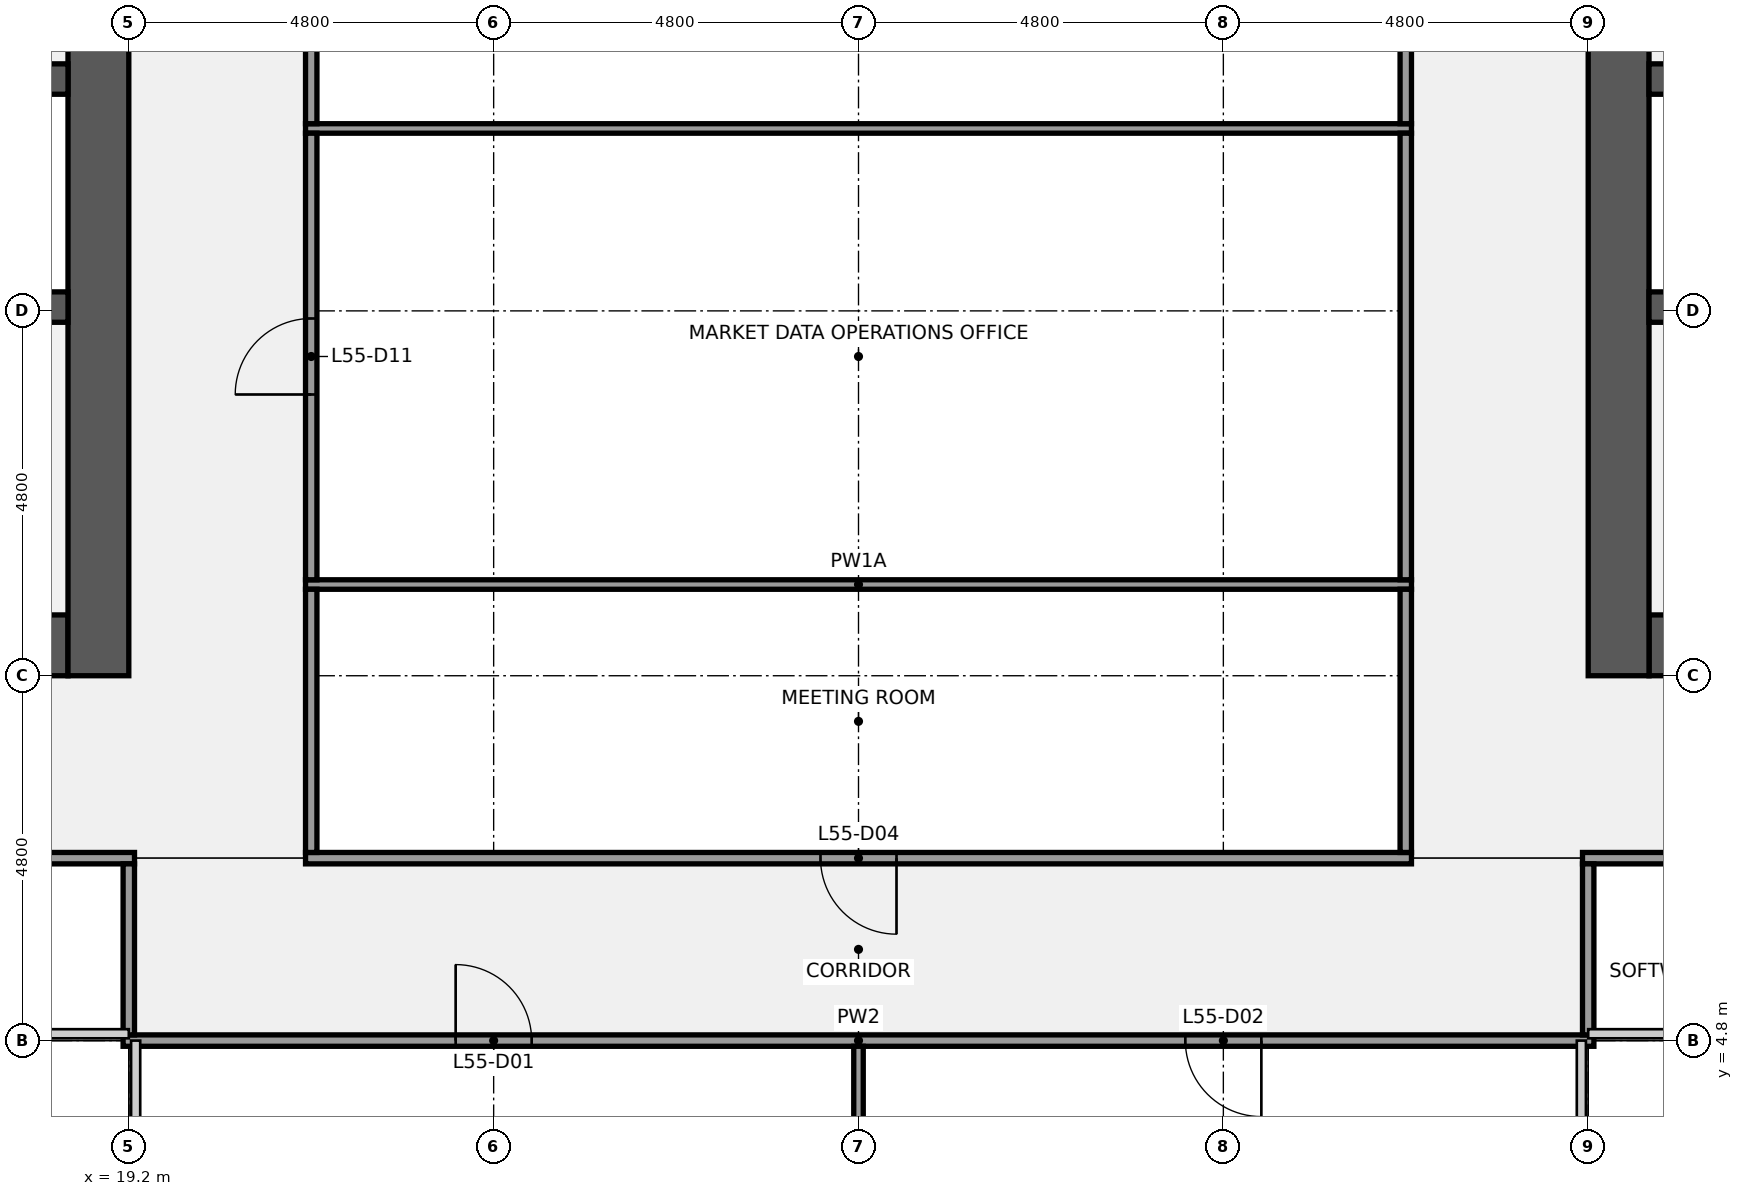
"""IFC4 building model, lengths in metres.
Left out: names, types, materials, properties, quantities, classifications, styles, units other than length and angle.
Written with IfcOpenShell. Run it as: python <this file> out.ifc"""

import sys

from ifc_helpers import new_model, si_unit, direction, frame, frame_2d, origin, place, context, subcontext, project, spatial, rectangle, extrude, element, fill, save


model = new_model("IFC4")
c1 = context("Model", 3, precision=1e-05, world=origin(), true_north=direction((0.0, 1.0)))
c2 = subcontext(c1, "Body", "Model", "MODEL_VIEW")
j1 = project(units=[si_unit("LENGTHUNIT", "METRE"), si_unit("PLANEANGLEUNIT", "RADIAN")], contexts=[c1])
p1 = place(None, origin())
s1 = spatial("IfcSite", under=j1, at=p1, CompositionType="ELEMENT")
p2 = place(p1, origin())
s2 = spatial("IfcBuilding", under=s1, at=p2, CompositionType="ELEMENT")
p3 = place(p2, frame((0.0, 0.0, 249.2)))
s3 = spatial("IfcBuildingStorey", under=s2, at=p3, CompositionType="ELEMENT", Elevation=249.2)
p4 = place(p3, frame((18.4, 10.0, 0.0), z_axis=(0.0, 0.0, 1.0), x_axis=(-1.0, 0.0, 0.0)))
e1 = element("IfcWall", 1, at=p4, inside=s3, PredefinedType="SHEAR", context=c2, shape_type="SweptSolid", body=[
    extrude(rectangle(XDim=4.0, YDim=0.8, at=frame_2d((2.0, 0.0))), origin(), (0.0, 0.0, 1.0), 3.84),
])
p5 = place(p4, frame((1.05, 0.0, 0.0)))
e2 = element("IfcOpeningElement", 2, at=p5, cuts=e1, PredefinedType="OPENING", context=c2, shape_type="SweptSolid", body=[
    extrude(rectangle(XDim=1.1, YDim=2.1, at=frame_2d((0.55, 1.05))), frame((0.0, 0.41, 0.0), z_axis=(0.0, -1.0, 0.0), x_axis=(1.0, 0.0, 0.0)), (0.0, 0.0, 1.0), 0.82),
])
p6 = place(p3, frame((18.8, 38.4, 0.0), z_axis=(0.0, 0.0, 1.0), x_axis=(0.0, -1.0, 0.0)))
e3 = element("IfcWall", 3, at=p6, inside=s3, PredefinedType="SHEAR", context=c2, shape_type="SweptSolid", body=[
    extrude(rectangle(XDim=28.8, YDim=0.8, at=frame_2d((14.4, 0.0))), origin(), (0.0, 0.0, 1.0), 3.84),
])
p7 = place(p6, frame((18.3, 0.0, 0.0)))
e4 = element("IfcOpeningElement", 4, at=p7, cuts=e3, PredefinedType="OPENING", context=c2, shape_type="SweptSolid", body=[
    extrude(rectangle(XDim=1.8, YDim=2.1, at=frame_2d((0.9, 1.05))), frame((0.0, 0.41, 0.0), z_axis=(0.0, -1.0, 0.0), x_axis=(1.0, 0.0, 0.0)), (0.0, 0.0, 1.0), 0.82),
])
p8 = place(p6, frame((8.7, 0.0, 0.0)))
e5 = element("IfcOpeningElement", 5, at=p8, cuts=e3, PredefinedType="OPENING", context=c2, shape_type="SweptSolid", body=[
    extrude(rectangle(XDim=1.8, YDim=2.1, at=frame_2d((0.9, 1.05))), frame((0.0, 0.41, 0.0), z_axis=(0.0, -1.0, 0.0), x_axis=(1.0, 0.0, 0.0)), (0.0, 0.0, 1.0), 0.82),
])
p9 = place(p3, frame((0.8, 14.45, 0.0), z_axis=(0.0, 0.0, 1.0), x_axis=(1.0, 0.0, 0.0)))
e6 = element("IfcWall", 6, at=p9, inside=s3, PredefinedType="SHEAR", context=c2, shape_type="SweptSolid", body=[
    extrude(rectangle(XDim=17.6, YDim=0.4, at=frame_2d((8.8, 0.0))), origin(), (0.0, 0.0, 1.0), 3.84),
])
p10 = place(p3, frame((0.8, 17.45, 0.0), z_axis=(0.0, 0.0, 1.0), x_axis=(1.0, 0.0, 0.0)))
e7 = element("IfcWall", 7, at=p10, inside=s3, PredefinedType="SHEAR", context=c2, shape_type="SweptSolid", body=[
    extrude(rectangle(XDim=17.6, YDim=0.4, at=frame_2d((8.8, 0.0))), origin(), (0.0, 0.0, 1.0), 3.84),
])
p11 = place(p10, frame((0.863, 0.0, 0.0)))
e8 = element("IfcOpeningElement", 8, at=p11, cuts=e7, PredefinedType="OPENING", context=c2, shape_type="SweptSolid", body=[
    extrude(rectangle(XDim=1.0, YDim=2.1, at=frame_2d((0.5, 1.05))), frame((0.0, 0.21, 0.0), z_axis=(0.0, -1.0, 0.0), x_axis=(1.0, 0.0, 0.0)), (0.0, 0.0, 1.0), 0.42),
])
p12 = place(p10, frame((3.8, 0.0, 0.0)))
e9 = element("IfcOpeningElement", 9, at=p12, cuts=e7, PredefinedType="OPENING", context=c2, shape_type="SweptSolid", body=[
    extrude(rectangle(XDim=1.0, YDim=2.1, at=frame_2d((0.5, 1.05))), frame((0.0, 0.21, 0.0), z_axis=(0.0, -1.0, 0.0), x_axis=(1.0, 0.0, 0.0)), (0.0, 0.0, 1.0), 0.42),
])
p13 = place(p10, frame((6.8, 0.0, 0.0)))
e10 = element("IfcOpeningElement", 10, at=p13, cuts=e7, PredefinedType="OPENING", context=c2, shape_type="SweptSolid", body=[
    extrude(rectangle(XDim=1.0, YDim=2.1, at=frame_2d((0.5, 1.05))), frame((0.0, 0.21, 0.0), z_axis=(0.0, -1.0, 0.0), x_axis=(1.0, 0.0, 0.0)), (0.0, 0.0, 1.0), 0.42),
])
p14 = place(p10, frame((10.4, 0.0, 0.0)))
e11 = element("IfcOpeningElement", 11, at=p14, cuts=e7, PredefinedType="OPENING", context=c2, shape_type="SweptSolid", body=[
    extrude(rectangle(XDim=1.0, YDim=2.1, at=frame_2d((0.5, 1.05))), frame((0.0, 0.21, 0.0), z_axis=(0.0, -1.0, 0.0), x_axis=(1.0, 0.0, 0.0)), (0.0, 0.0, 1.0), 0.42),
])
p15 = place(p10, frame((14.837, 0.0, 0.0)))
e12 = element("IfcOpeningElement", 12, at=p15, cuts=e7, PredefinedType="OPENING", context=c2, shape_type="SweptSolid", body=[
    extrude(rectangle(XDim=1.0, YDim=2.1, at=frame_2d((0.5, 1.05))), frame((0.0, 0.21, 0.0), z_axis=(0.0, -1.0, 0.0), x_axis=(1.0, 0.0, 0.0)), (0.0, 0.0, 1.0), 0.42),
])
p16 = place(p3, frame((43.2, 10.0, 0.0), z_axis=(0.0, 0.0, 1.0), x_axis=(-1.0, 0.0, 0.0)))
e13 = element("IfcWall", 13, at=p16, inside=s3, PredefinedType="SHEAR", context=c2, shape_type="SweptSolid", body=[
    extrude(rectangle(XDim=4.0, YDim=0.8, at=frame_2d((2.0, 0.0))), origin(), (0.0, 0.0, 1.0), 3.84),
])
p17 = place(p16, frame((1.85, 0.0, 0.0)))
e14 = element("IfcOpeningElement", 14, at=p17, cuts=e13, PredefinedType="OPENING", context=c2, shape_type="SweptSolid", body=[
    extrude(rectangle(XDim=1.1, YDim=2.1, at=frame_2d((0.55, 1.05))), frame((0.0, 0.41, 0.0), z_axis=(0.0, -1.0, 0.0), x_axis=(1.0, 0.0, 0.0)), (0.0, 0.0, 1.0), 0.82),
])
p18 = place(p3, frame((38.8, 9.6, 0.0), z_axis=(0.0, 0.0, 1.0), x_axis=(0.0, 1.0, 0.0)))
e15 = element("IfcWall", 15, at=p18, inside=s3, PredefinedType="SHEAR", context=c2, shape_type="SweptSolid", body=[
    extrude(rectangle(XDim=28.8, YDim=0.8, at=frame_2d((14.4, 0.0))), origin(), (0.0, 0.0, 1.0), 3.84),
])
p19 = place(p18, frame((8.7, 0.0, 0.0)))
e16 = element("IfcOpeningElement", 16, at=p19, cuts=e15, PredefinedType="OPENING", context=c2, shape_type="SweptSolid", body=[
    extrude(rectangle(XDim=1.8, YDim=2.1, at=frame_2d((0.9, 1.05))), frame((0.0, 0.41, 0.0), z_axis=(0.0, -1.0, 0.0), x_axis=(1.0, 0.0, 0.0)), (0.0, 0.0, 1.0), 0.82),
])
p20 = place(p18, frame((18.3, 0.0, 0.0)))
e17 = element("IfcOpeningElement", 17, at=p20, cuts=e15, PredefinedType="OPENING", context=c2, shape_type="SweptSolid", body=[
    extrude(rectangle(XDim=1.8, YDim=2.1, at=frame_2d((0.9, 1.05))), frame((0.0, 0.41, 0.0), z_axis=(0.0, -1.0, 0.0), x_axis=(1.0, 0.0, 0.0)), (0.0, 0.0, 1.0), 0.82),
])
p21 = place(p3, frame((39.2, 14.45, 0.0), z_axis=(0.0, 0.0, 1.0), x_axis=(1.0, 0.0, 0.0)))
e18 = element("IfcWall", 18, at=p21, inside=s3, PredefinedType="SHEAR", context=c2, shape_type="SweptSolid", body=[
    extrude(rectangle(XDim=17.6, YDim=0.4, at=frame_2d((8.8, 0.0))), origin(), (0.0, 0.0, 1.0), 3.84),
])
p22 = place(p3, frame((39.2, 17.45, 0.0), z_axis=(0.0, 0.0, 1.0), x_axis=(1.0, 0.0, 0.0)))
e19 = element("IfcWall", 19, at=p22, inside=s3, PredefinedType="SHEAR", context=c2, shape_type="SweptSolid", body=[
    extrude(rectangle(XDim=17.6, YDim=0.4, at=frame_2d((8.8, 0.0))), origin(), (0.0, 0.0, 1.0), 3.84),
])
p23 = place(p22, frame((15.738, 0.0, 0.0)))
e20 = element("IfcOpeningElement", 20, at=p23, cuts=e19, PredefinedType="OPENING", context=c2, shape_type="SweptSolid", body=[
    extrude(rectangle(XDim=1.0, YDim=2.1, at=frame_2d((0.5, 1.05))), frame((0.0, 0.21, 0.0), z_axis=(0.0, -1.0, 0.0), x_axis=(1.0, 0.0, 0.0)), (0.0, 0.0, 1.0), 0.42),
])
p24 = place(p22, frame((12.8, 0.0, 0.0)))
e21 = element("IfcOpeningElement", 21, at=p24, cuts=e19, PredefinedType="OPENING", context=c2, shape_type="SweptSolid", body=[
    extrude(rectangle(XDim=1.0, YDim=2.1, at=frame_2d((0.5, 1.05))), frame((0.0, 0.21, 0.0), z_axis=(0.0, -1.0, 0.0), x_axis=(1.0, 0.0, 0.0)), (0.0, 0.0, 1.0), 0.42),
])
p25 = place(p22, frame((9.8, 0.0, 0.0)))
e22 = element("IfcOpeningElement", 22, at=p25, cuts=e19, PredefinedType="OPENING", context=c2, shape_type="SweptSolid", body=[
    extrude(rectangle(XDim=1.0, YDim=2.1, at=frame_2d((0.5, 1.05))), frame((0.0, 0.21, 0.0), z_axis=(0.0, -1.0, 0.0), x_axis=(1.0, 0.0, 0.0)), (0.0, 0.0, 1.0), 0.42),
])
p26 = place(p22, frame((6.2, 0.0, 0.0)))
e23 = element("IfcOpeningElement", 23, at=p26, cuts=e19, PredefinedType="OPENING", context=c2, shape_type="SweptSolid", body=[
    extrude(rectangle(XDim=1.0, YDim=2.1, at=frame_2d((0.5, 1.05))), frame((0.0, 0.21, 0.0), z_axis=(0.0, -1.0, 0.0), x_axis=(1.0, 0.0, 0.0)), (0.0, 0.0, 1.0), 0.42),
])
p27 = place(p22, frame((1.762, 0.0, 0.0)))
e24 = element("IfcOpeningElement", 24, at=p27, cuts=e19, PredefinedType="OPENING", context=c2, shape_type="SweptSolid", body=[
    extrude(rectangle(XDim=1.0, YDim=2.1, at=frame_2d((0.5, 1.05))), frame((0.0, 0.21, 0.0), z_axis=(0.0, -1.0, 0.0), x_axis=(1.0, 0.0, 0.0)), (0.0, 0.0, 1.0), 0.42),
])
p28 = place(p3, frame((19.125, 4.8, 0.0), z_axis=(0.0, 0.0, 1.0), x_axis=(1.0, 0.0, 0.0)))
e25 = element("IfcWall", 25, at=p28, inside=s3, PredefinedType="PARTITIONING", context=c2, shape_type="SweptSolid", body=[
    extrude(rectangle(XDim=19.35, YDim=0.15, at=frame_2d((9.675, 0.0))), origin(), (0.0, 0.0, 1.0), 2.87),
])
p29 = place(p28, frame((4.375, 0.0, 0.0)))
e26 = element("IfcOpeningElement", 26, at=p29, cuts=e25, PredefinedType="OPENING", context=c2, shape_type="SweptSolid", body=[
    extrude(rectangle(XDim=1.0, YDim=2.1, at=frame_2d((0.5, 1.05))), frame((0.0, 0.085, 0.0), z_axis=(0.0, -1.0, 0.0), x_axis=(1.0, 0.0, 0.0)), (0.0, 0.0, 1.0), 0.17),
])
p30 = place(p28, frame((13.975, 0.0, 0.0)))
e27 = element("IfcOpeningElement", 27, at=p30, cuts=e25, PredefinedType="OPENING", context=c2, shape_type="SweptSolid", body=[
    extrude(rectangle(XDim=1.0, YDim=2.1, at=frame_2d((0.5, 1.05))), frame((0.0, 0.085, 0.0), z_axis=(0.0, -1.0, 0.0), x_axis=(1.0, 0.0, 0.0)), (0.0, 0.0, 1.0), 0.17),
])
p31 = place(p3, frame((14.5, 7.2, 0.0), z_axis=(0.0, 0.0, 1.0), x_axis=(1.0, 0.0, 0.0)))
e28 = element("IfcWall", 28, at=p31, inside=s3, PredefinedType="PARTITIONING", context=c2, shape_type="SweptSolid", body=[
    extrude(rectangle(XDim=4.775, YDim=0.15, at=frame_2d((2.387, 0.0))), origin(), (0.0, 0.0, 1.0), 2.87),
])
p32 = place(p31, frame((1.85, 0.0, 0.0)))
e29 = element("IfcOpeningElement", 29, at=p32, cuts=e28, PredefinedType="OPENING", context=c2, shape_type="SweptSolid", body=[
    extrude(rectangle(XDim=1.0, YDim=2.1, at=frame_2d((0.5, 1.05))), frame((0.0, 0.085, 0.0), z_axis=(0.0, -1.0, 0.0), x_axis=(1.0, 0.0, 0.0)), (0.0, 0.0, 1.0), 0.17),
])
p33 = place(p3, frame((21.525, 7.2, 0.0), z_axis=(0.0, 0.0, 1.0), x_axis=(1.0, 0.0, 0.0)))
e30 = element("IfcWall", 30, at=p33, inside=s3, PredefinedType="PARTITIONING", context=c2, shape_type="SweptSolid", body=[
    extrude(rectangle(XDim=14.55, YDim=0.15, at=frame_2d((7.275, 0.0))), origin(), (0.0, 0.0, 1.0), 2.87),
])
p34 = place(p33, frame((6.775, 0.0, 0.0)))
e31 = element("IfcOpeningElement", 31, at=p34, cuts=e30, PredefinedType="OPENING", context=c2, shape_type="SweptSolid", body=[
    extrude(rectangle(XDim=1.0, YDim=2.1, at=frame_2d((0.5, 1.05))), frame((0.0, 0.085, 0.0), z_axis=(0.0, -1.0, 0.0), x_axis=(1.0, 0.0, 0.0)), (0.0, 0.0, 1.0), 0.17),
])
p35 = place(p3, frame((38.325, 7.2, 0.0), z_axis=(0.0, 0.0, 1.0), x_axis=(1.0, 0.0, 0.0)))
e32 = element("IfcWall", 32, at=p35, inside=s3, PredefinedType="PARTITIONING", context=c2, shape_type="SweptSolid", body=[
    extrude(rectangle(XDim=4.775, YDim=0.15, at=frame_2d((2.388, 0.0))), origin(), (0.0, 0.0, 1.0), 2.87),
])
p36 = place(p35, frame((1.925, 0.0, 0.0)))
e33 = element("IfcOpeningElement", 33, at=p36, cuts=e32, PredefinedType="OPENING", context=c2, shape_type="SweptSolid", body=[
    extrude(rectangle(XDim=1.0, YDim=2.1, at=frame_2d((0.5, 1.05))), frame((0.0, 0.085, 0.0), z_axis=(0.0, -1.0, 0.0), x_axis=(1.0, 0.0, 0.0)), (0.0, 0.0, 1.0), 0.17),
])
for number, where, z_axis, x_axis in (
    (34, (21.525, 10.8, 0.0), (0.0, 0.0, 1.0), (1.0, 0.0, 0.0)),
    (35, (21.525, 16.8, 0.0), (0.0, 0.0, 1.0), (1.0, 0.0, 0.0)),
):
    element("IfcWall", number, at=place(p3, frame(where, z_axis=z_axis, x_axis=x_axis)), inside=s3, PredefinedType="PARTITIONING", context=c2, shape_type="SweptSolid", body=[
        extrude(rectangle(XDim=14.55, YDim=0.125, at=frame_2d((7.275, 0.0))), origin(), (0.0, 0.0, 1.0), 2.87),
    ])
p37 = place(p3, frame((19.2, 4.875, 0.0), z_axis=(0.0, 0.0, 1.0), x_axis=(0.0, 1.0, 0.0)))
e36 = element("IfcWall", 36, at=p37, inside=s3, PredefinedType="PARTITIONING", context=c2, shape_type="SweptSolid", body=[
    extrude(rectangle(XDim=2.25, YDim=0.15, at=frame_2d((1.125, 0.0))), origin(), (0.0, 0.0, 1.0), 2.87),
])
p38 = place(p3, frame((21.6, 7.275, 0.0), z_axis=(0.0, 0.0, 1.0), x_axis=(0.0, 1.0, 0.0)))
e37 = element("IfcWall", 37, at=p38, inside=s3, PredefinedType="PARTITIONING", context=c2, shape_type="SweptSolid", body=[
    extrude(rectangle(XDim=3.463, YDim=0.15, at=frame_2d((1.731, 0.0))), origin(), (0.0, 0.0, 1.0), 2.87),
])
p39 = place(p3, frame((21.6, 10.863, 0.0), z_axis=(0.0, 0.0, 1.0), x_axis=(0.0, 1.0, 0.0)))
e38 = element("IfcWall", 38, at=p39, inside=s3, PredefinedType="PARTITIONING", context=c2, shape_type="SweptSolid", body=[
    extrude(rectangle(XDim=5.875, YDim=0.15, at=frame_2d((2.938, 0.0))), origin(), (0.0, 0.0, 1.0), 2.87),
])
p40 = place(p39, frame((2.438, 0.0, 0.0)))
e39 = element("IfcOpeningElement", 39, at=p40, cuts=e38, PredefinedType="OPENING", context=c2, shape_type="SweptSolid", body=[
    extrude(rectangle(XDim=1.0, YDim=2.1, at=frame_2d((0.5, 1.05))), frame((0.0, 0.085, 0.0), z_axis=(0.0, -1.0, 0.0), x_axis=(1.0, 0.0, 0.0)), (0.0, 0.0, 1.0), 0.17),
])
p41 = place(p3, frame((21.6, 16.863, 0.0), z_axis=(0.0, 0.0, 1.0), x_axis=(0.0, 1.0, 0.0)))
e40 = element("IfcWall", 40, at=p41, inside=s3, PredefinedType="PARTITIONING", context=c2, shape_type="SweptSolid", body=[
    extrude(rectangle(XDim=8.275, YDim=0.15, at=frame_2d((4.137, 0.0))), origin(), (0.0, 0.0, 1.0), 2.87),
])
p42 = place(p41, frame((3.637, 0.0, 0.0)))
e41 = element("IfcOpeningElement", 41, at=p42, cuts=e40, PredefinedType="OPENING", context=c2, shape_type="SweptSolid", body=[
    extrude(rectangle(XDim=1.0, YDim=2.1, at=frame_2d((0.5, 1.05))), frame((0.0, 0.085, 0.0), z_axis=(0.0, -1.0, 0.0), x_axis=(1.0, 0.0, 0.0)), (0.0, 0.0, 1.0), 0.17),
])
p43 = place(p3, frame((28.8, 0.55, 0.0), z_axis=(0.0, 0.0, 1.0), x_axis=(0.0, 1.0, 0.0)))
e42 = element("IfcWall", 42, at=p43, inside=s3, PredefinedType="PARTITIONING", context=c2, shape_type="SweptSolid", body=[
    extrude(rectangle(XDim=4.175, YDim=0.125, at=frame_2d((2.087, 0.0))), origin(), (0.0, 0.0, 1.0), 2.87),
])
p44 = place(p3, frame((36.0, 7.275, 0.0), z_axis=(0.0, 0.0, 1.0), x_axis=(0.0, 1.0, 0.0)))
e43 = element("IfcWall", 43, at=p44, inside=s3, PredefinedType="PARTITIONING", context=c2, shape_type="SweptSolid", body=[
    extrude(rectangle(XDim=3.463, YDim=0.15, at=frame_2d((1.731, 0.0))), origin(), (0.0, 0.0, 1.0), 2.87),
])
p45 = place(p3, frame((36.0, 10.863, 0.0), z_axis=(0.0, 0.0, 1.0), x_axis=(0.0, 1.0, 0.0)))
e44 = element("IfcWall", 44, at=p45, inside=s3, PredefinedType="PARTITIONING", context=c2, shape_type="SweptSolid", body=[
    extrude(rectangle(XDim=5.875, YDim=0.15, at=frame_2d((2.938, 0.0))), origin(), (0.0, 0.0, 1.0), 2.87),
])
p46 = place(p3, frame((36.0, 16.863, 0.0), z_axis=(0.0, 0.0, 1.0), x_axis=(0.0, 1.0, 0.0)))
e45 = element("IfcWall", 45, at=p46, inside=s3, PredefinedType="PARTITIONING", context=c2, shape_type="SweptSolid", body=[
    extrude(rectangle(XDim=8.275, YDim=0.15, at=frame_2d((4.137, 0.0))), origin(), (0.0, 0.0, 1.0), 2.87),
])
p47 = place(p3, frame((38.4, 4.875, 0.0), z_axis=(0.0, 0.0, 1.0), x_axis=(0.0, 1.0, 0.0)))
e46 = element("IfcWall", 46, at=p47, inside=s3, PredefinedType="PARTITIONING", context=c2, shape_type="SweptSolid", body=[
    extrude(rectangle(XDim=2.25, YDim=0.15, at=frame_2d((1.125, 0.0))), origin(), (0.0, 0.0, 1.0), 2.87),
])
p48 = place(p29, origin())
e47 = element("IfcDoor", 47, at=p48, inside=s3, OperationType="SINGLE_SWING_LEFT", PredefinedType="DOOR", context=c2, shape_type="SweptSolid", body=[
    extrude(rectangle(XDim=1.0, YDim=2.1, at=frame_2d((0.5, 1.05))), frame((0.0, 0.025, 0.0), z_axis=(0.0, -1.0, 0.0), x_axis=(1.0, 0.0, 0.0)), (0.0, 0.0, 1.0), 0.05),
])
fill(e26, e47)
p49 = place(p30, origin())
e48 = element("IfcDoor", 48, at=p49, inside=s3, OperationType="SINGLE_SWING_RIGHT", PredefinedType="DOOR", context=c2, shape_type="SweptSolid", body=[
    extrude(rectangle(XDim=1.0, YDim=2.1, at=frame_2d((0.5, 1.05))), frame((0.0, 0.025, 0.0), z_axis=(0.0, -1.0, 0.0), x_axis=(1.0, 0.0, 0.0)), (0.0, 0.0, 1.0), 0.05),
])
fill(e27, e48)
p50 = place(p34, origin())
e49 = element("IfcDoor", 49, at=p50, inside=s3, OperationType="SINGLE_SWING_RIGHT", PredefinedType="DOOR", context=c2, shape_type="SweptSolid", body=[
    extrude(rectangle(XDim=1.0, YDim=2.1, at=frame_2d((0.5, 1.05))), frame((0.0, 0.025, 0.0), z_axis=(0.0, -1.0, 0.0), x_axis=(1.0, 0.0, 0.0)), (0.0, 0.0, 1.0), 0.05),
])
fill(e31, e49)
p51 = place(p40, origin())
e50 = element("IfcDoor", 50, at=p51, inside=s3, OperationType="SINGLE_SWING_LEFT", PredefinedType="DOOR", context=c2, shape_type="SweptSolid", body=[
    extrude(rectangle(XDim=1.0, YDim=2.1, at=frame_2d((0.5, 1.05))), frame((0.0, 0.025, 0.0), z_axis=(0.0, -1.0, 0.0), x_axis=(1.0, 0.0, 0.0)), (0.0, 0.0, 1.0), 0.05),
])
fill(e39, e50)
save(model, sys.argv[1])
